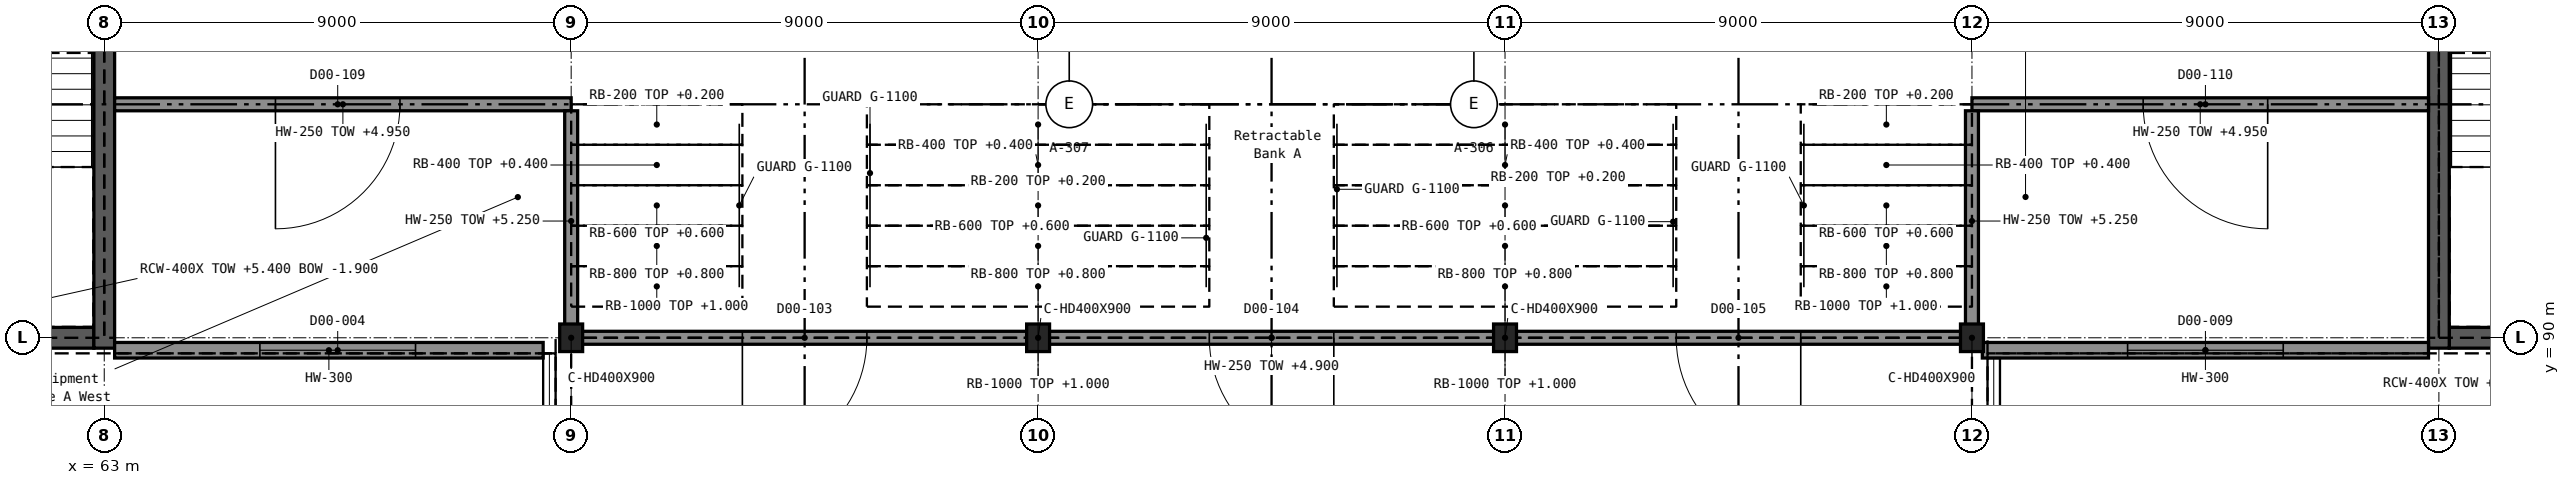
"""IFC4 building model, lengths in metres.
Left out: names, types, materials, properties, quantities, classifications, styles, units other than length and angle.
Written with IfcOpenShell. Run it as: python <this file> out.ifc"""

import sys

from ifc_helpers import new_model, si_unit, direction, frame, frame_2d, origin, origin_2d, place, context, subcontext, project, spatial, rectangle, i_section, extrude, element, fill, save


model = new_model("IFC4")
c1 = context("Model", 3, precision=1e-05, world=origin(), true_north=direction((0.0, 1.0)))
c2 = subcontext(c1, "Body", "Model", "MODEL_VIEW")
j1 = project(units=[si_unit("LENGTHUNIT", "METRE"), si_unit("PLANEANGLEUNIT", "RADIAN")], contexts=[c1])
p1 = place(None, origin())
s1 = spatial("IfcSite", under=j1, at=p1, CompositionType="ELEMENT")
p2 = place(p1, origin())
s2 = spatial("IfcBuilding", under=s1, at=p2, CompositionType="ELEMENT")
p3 = place(p2, origin())
s3 = spatial("IfcBuildingStorey", under=s2, at=p3, CompositionType="ELEMENT", Elevation=0.0)
for number, where, z_axis, x_axis in (
    (1, (72.0, 90.0, -0.3), (0.0, 0.0, 1.0), (1.0, 0.0, 0.0)),
    (2, (81.0, 90.0, -0.3), (0.0, 0.0, 1.0), (1.0, 0.0, 0.0)),
    (3, (90.0, 90.0, -0.3), (0.0, 0.0, 1.0), (1.0, 0.0, 0.0)),
    (4, (99.0, 90.0, -0.3), (0.0, 0.0, 1.0), (1.0, 0.0, 0.0)),
):
    element("IfcColumn", number, at=place(p3, frame(where, z_axis=z_axis, x_axis=x_axis)), inside=s3, PredefinedType="COLUMN", context=c2, shape_type="SweptSolid", body=[
        extrude(i_section(OverallWidth=0.442, OverallDepth=0.531, WebThickness=0.066, FlangeThickness=0.106, FilletRadius=0.015, at=origin_2d()), origin(), (0.0, 0.0, 1.0), 5.7),
    ])
p4 = place(p3, frame((54.2, 90.0, -1.9), z_axis=(0.0, 0.0, 1.0), x_axis=(1.0, 0.0, 0.0)))
e5 = element("IfcWall", 5, at=p4, inside=s3, PredefinedType="SHEAR", context=c2, shape_type="SweptSolid", body=[
    extrude(rectangle(XDim=8.6, YDim=0.4, at=frame_2d((4.3, 0.0))), origin(), (0.0, 0.0, 1.0), 7.3),
])
p5 = place(p4, frame((3.9, 0.0, 3.4)))
e6 = element("IfcOpeningElement", 6, at=p5, cuts=e5, PredefinedType="OPENING", context=c2, shape_type="SweptSolid", body=[
    extrude(rectangle(XDim=1.2, YDim=1.8, at=frame_2d((0.6, 0.9))), frame((0.0, 0.211, 0.0), z_axis=(0.0, -1.0, 0.0), x_axis=(1.0, 0.0, 0.0)), (0.0, 0.0, 1.0), 0.422),
])
p6 = place(p4, frame((0.7, 0.0, 1.9)))
e7 = element("IfcOpeningElement", 7, at=p6, cuts=e5, PredefinedType="OPENING", context=c2, shape_type="SweptSolid", body=[
    extrude(rectangle(XDim=1.2, YDim=2.1, at=frame_2d((0.6, 1.05))), frame((0.0, 0.211, 0.0), z_axis=(0.0, -1.0, 0.0), x_axis=(1.0, 0.0, 0.0)), (0.0, 0.0, 1.0), 0.422),
])
p7 = place(p3, frame((63.0, 89.8, -1.9), z_axis=(0.0, 0.0, 1.0), x_axis=(0.0, 1.0, 0.0)))
e8 = element("IfcWall", 8, at=p7, inside=s3, PredefinedType="SHEAR", context=c2, shape_type="SweptSolid", body=[
    extrude(rectangle(XDim=27.4, YDim=0.4, at=frame_2d((13.7, 0.0))), origin(), (0.0, 0.0, 1.0), 7.3),
])
p8 = place(p3, frame((108.2, 90.0, -1.9), z_axis=(0.0, 0.0, 1.0), x_axis=(1.0, 0.0, 0.0)))
e9 = element("IfcWall", 9, at=p8, inside=s3, PredefinedType="SHEAR", context=c2, shape_type="SweptSolid", body=[
    extrude(rectangle(XDim=8.6, YDim=0.4, at=frame_2d((4.3, 0.0))), origin(), (0.0, 0.0, 1.0), 7.3),
])
p9 = place(p8, frame((3.9, 0.0, 3.4)))
e10 = element("IfcOpeningElement", 10, at=p9, cuts=e9, PredefinedType="OPENING", context=c2, shape_type="SweptSolid", body=[
    extrude(rectangle(XDim=1.2, YDim=1.8, at=frame_2d((0.6, 0.9))), frame((0.0, 0.211, 0.0), z_axis=(0.0, -1.0, 0.0), x_axis=(1.0, 0.0, 0.0)), (0.0, 0.0, 1.0), 0.422),
])
p10 = place(p8, frame((6.7, 0.0, 1.9)))
e11 = element("IfcOpeningElement", 11, at=p10, cuts=e9, PredefinedType="OPENING", context=c2, shape_type="SweptSolid", body=[
    extrude(rectangle(XDim=1.2, YDim=2.1, at=frame_2d((0.6, 1.05))), frame((0.0, 0.211, 0.0), z_axis=(0.0, -1.0, 0.0), x_axis=(1.0, 0.0, 0.0)), (0.0, 0.0, 1.0), 0.422),
])
p11 = place(p3, frame((108.0, 89.8, -1.9), z_axis=(0.0, 0.0, 1.0), x_axis=(0.0, 1.0, 0.0)))
e12 = element("IfcWall", 12, at=p11, inside=s3, PredefinedType="SHEAR", context=c2, shape_type="SweptSolid", body=[
    extrude(rectangle(XDim=27.4, YDim=0.4, at=frame_2d((13.7, 0.0))), origin(), (0.0, 0.0, 1.0), 7.3),
])
p12 = place(p3, frame((63.2, 89.76, 0.0), z_axis=(0.0, 0.0, 1.0), x_axis=(1.0, 0.0, 0.0)))
e13 = element("IfcWall", 13, at=p12, inside=s3, PredefinedType="SOLIDWALL", context=c2, shape_type="SweptSolid", body=[
    extrude(rectangle(XDim=8.26, YDim=0.3, at=frame_2d((4.13, 0.0))), origin(), (0.0, 0.0, 1.0), 5.4),
])
p13 = place(p12, frame((2.8, 0.0, 0.0)))
e14 = element("IfcOpeningElement", 14, at=p13, cuts=e13, PredefinedType="OPENING", context=c2, shape_type="SweptSolid", body=[
    extrude(rectangle(XDim=3.0, YDim=2.4, at=frame_2d((1.5, 1.2))), frame((0.0, 0.161, 0.0), z_axis=(0.0, -1.0, 0.0), x_axis=(1.0, 0.0, 0.0)), (0.0, 0.0, 1.0), 0.322),
])
p14 = place(p3, frame((99.2, 89.76, 0.0), z_axis=(0.0, 0.0, 1.0), x_axis=(1.0, 0.0, 0.0)))
e15 = element("IfcWall", 15, at=p14, inside=s3, PredefinedType="SOLIDWALL", context=c2, shape_type="SweptSolid", body=[
    extrude(rectangle(XDim=8.6, YDim=0.3, at=frame_2d((4.3, 0.0))), origin(), (0.0, 0.0, 1.0), 5.4),
])
p15 = place(p14, frame((2.8, 0.0, 0.0)))
e16 = element("IfcOpeningElement", 16, at=p15, cuts=e15, PredefinedType="OPENING", context=c2, shape_type="SweptSolid", body=[
    extrude(rectangle(XDim=3.0, YDim=2.4, at=frame_2d((1.5, 1.2))), frame((0.0, 0.161, 0.0), z_axis=(0.0, -1.0, 0.0), x_axis=(1.0, 0.0, 0.0)), (0.0, 0.0, 1.0), 0.322),
])
p16 = place(p3, frame((72.0, 90.0, 0.0), z_axis=(0.0, 0.0, 1.0), x_axis=(1.0, 0.0, 0.0)))
e17 = element("IfcWall", 17, at=p16, inside=s3, PredefinedType="SOLIDWALL", context=c2, shape_type="SweptSolid", body=[
    extrude(rectangle(XDim=27.0, YDim=0.25, at=frame_2d((13.5, 0.0))), origin(), (0.0, 0.0, 1.0), 4.9),
])
p17 = place(p16, frame((3.3, 0.0, 0.0)))
e18 = element("IfcOpeningElement", 18, at=p17, cuts=e17, PredefinedType="OPENING", context=c2, shape_type="SweptSolid", body=[
    extrude(rectangle(XDim=2.4, YDim=2.4, at=frame_2d((1.2, 1.2))), frame((0.0, 0.136, 0.0), z_axis=(0.0, -1.0, 0.0), x_axis=(1.0, 0.0, 0.0)), (0.0, 0.0, 1.0), 0.272),
])
p18 = place(p16, frame((12.3, 0.0, 0.0)))
e19 = element("IfcOpeningElement", 19, at=p18, cuts=e17, PredefinedType="OPENING", context=c2, shape_type="SweptSolid", body=[
    extrude(rectangle(XDim=2.4, YDim=2.4, at=frame_2d((1.2, 1.2))), frame((0.0, 0.136, 0.0), z_axis=(0.0, -1.0, 0.0), x_axis=(1.0, 0.0, 0.0)), (0.0, 0.0, 1.0), 0.272),
])
p19 = place(p16, frame((21.3, 0.0, 0.0)))
e20 = element("IfcOpeningElement", 20, at=p19, cuts=e17, PredefinedType="OPENING", context=c2, shape_type="SweptSolid", body=[
    extrude(rectangle(XDim=2.4, YDim=2.4, at=frame_2d((1.2, 1.2))), frame((0.0, 0.136, 0.0), z_axis=(0.0, -1.0, 0.0), x_axis=(1.0, 0.0, 0.0)), (0.0, 0.0, 1.0), 0.272),
])
p20 = place(p3, frame((63.2, 94.5, 0.0), z_axis=(0.0, 0.0, 1.0), x_axis=(1.0, 0.0, 0.0)))
e21 = element("IfcWall", 21, at=p20, inside=s3, PredefinedType="SOLIDWALL", context=c2, shape_type="SweptSolid", body=[
    extrude(rectangle(XDim=8.8, YDim=0.25, at=frame_2d((4.4, 0.0))), origin(), (0.0, 0.0, 1.0), 4.95),
])
p21 = place(p20, frame((3.1, 0.0, 0.0)))
e22 = element("IfcOpeningElement", 22, at=p21, cuts=e21, PredefinedType="OPENING", context=c2, shape_type="SweptSolid", body=[
    extrude(rectangle(XDim=2.4, YDim=3.0, at=frame_2d((1.2, 1.5))), frame((0.0, 0.136, 0.0), z_axis=(0.0, -1.0, 0.0), x_axis=(1.0, 0.0, 0.0)), (0.0, 0.0, 1.0), 0.272),
])
p22 = place(p3, frame((99.0, 94.5, 0.0), z_axis=(0.0, 0.0, 1.0), x_axis=(1.0, 0.0, 0.0)))
e23 = element("IfcWall", 23, at=p22, inside=s3, PredefinedType="SOLIDWALL", context=c2, shape_type="SweptSolid", body=[
    extrude(rectangle(XDim=8.8, YDim=0.25, at=frame_2d((4.4, 0.0))), origin(), (0.0, 0.0, 1.0), 4.95),
])
p23 = place(p22, frame((3.3, 0.0, 0.0)))
e24 = element("IfcOpeningElement", 24, at=p23, cuts=e23, PredefinedType="OPENING", context=c2, shape_type="SweptSolid", body=[
    extrude(rectangle(XDim=2.4, YDim=3.0, at=frame_2d((1.2, 1.5))), frame((0.0, 0.136, 0.0), z_axis=(0.0, -1.0, 0.0), x_axis=(1.0, 0.0, 0.0)), (0.0, 0.0, 1.0), 0.272),
])
for number, where, z_axis, x_axis in (
    (25, (72.0, 90.125, 0.0), (0.0, 0.0, 1.0), (0.0, 1.0, 0.0)),
    (26, (99.0, 90.125, 0.0), (0.0, 0.0, 1.0), (0.0, 1.0, 0.0)),
):
    element("IfcWall", number, at=place(p3, frame(where, z_axis=z_axis, x_axis=x_axis)), inside=s3, PredefinedType="SOLIDWALL", context=c2, shape_type="SweptSolid", body=[
        extrude(rectangle(XDim=4.25, YDim=0.25, at=frame_2d((2.125, 0.0))), origin(), (0.0, 0.0, 1.0), 5.25),
    ])
p24 = place(p13, frame((3.0, 0.0, 0.0), z_axis=(0.0, 0.0, 1.0), x_axis=(-1.0, 0.0, 0.0)))
e27 = element("IfcDoor", 27, at=p24, inside=s3, OperationType="ROLLINGUP", PredefinedType="DOOR", context=c2, shape_type="SweptSolid", body=[
    extrude(rectangle(XDim=3.0, YDim=2.4, at=frame_2d((1.5, 1.2))), frame((0.0, 0.025, 0.0), z_axis=(0.0, -1.0, 0.0), x_axis=(1.0, 0.0, 0.0)), (0.0, 0.0, 1.0), 0.05),
])
fill(e14, e27)
p25 = place(p15, frame((3.0, 0.0, 0.0), z_axis=(0.0, 0.0, 1.0), x_axis=(-1.0, 0.0, 0.0)))
e28 = element("IfcDoor", 28, at=p25, inside=s3, OperationType="ROLLINGUP", PredefinedType="DOOR", context=c2, shape_type="SweptSolid", body=[
    extrude(rectangle(XDim=3.0, YDim=2.4, at=frame_2d((1.5, 1.2))), frame((0.0, 0.025, 0.0), z_axis=(0.0, -1.0, 0.0), x_axis=(1.0, 0.0, 0.0)), (0.0, 0.0, 1.0), 0.05),
])
fill(e16, e28)
p26 = place(p17, frame((2.4, 0.0, 0.0), z_axis=(0.0, 0.0, 1.0), x_axis=(-1.0, 0.0, 0.0)))
e29 = element("IfcDoor", 29, at=p26, inside=s3, OperationType="DOUBLE_DOOR_SINGLE_SWING", PredefinedType="DOOR", context=c2, shape_type="SweptSolid", body=[
    extrude(rectangle(XDim=2.4, YDim=2.4, at=frame_2d((1.2, 1.2))), frame((0.0, 0.025, 0.0), z_axis=(0.0, -1.0, 0.0), x_axis=(1.0, 0.0, 0.0)), (0.0, 0.0, 1.0), 0.05),
])
fill(e18, e29)
p27 = place(p18, frame((2.4, 0.0, 0.0), z_axis=(0.0, 0.0, 1.0), x_axis=(-1.0, 0.0, 0.0)))
e30 = element("IfcDoor", 30, at=p27, inside=s3, OperationType="DOUBLE_DOOR_SINGLE_SWING", PredefinedType="DOOR", context=c2, shape_type="SweptSolid", body=[
    extrude(rectangle(XDim=2.4, YDim=2.4, at=frame_2d((1.2, 1.2))), frame((0.0, 0.025, 0.0), z_axis=(0.0, -1.0, 0.0), x_axis=(1.0, 0.0, 0.0)), (0.0, 0.0, 1.0), 0.05),
])
fill(e19, e30)
p28 = place(p19, frame((2.4, 0.0, 0.0), z_axis=(0.0, 0.0, 1.0), x_axis=(-1.0, 0.0, 0.0)))
e31 = element("IfcDoor", 31, at=p28, inside=s3, OperationType="DOUBLE_DOOR_SINGLE_SWING", PredefinedType="DOOR", context=c2, shape_type="SweptSolid", body=[
    extrude(rectangle(XDim=2.4, YDim=2.4, at=frame_2d((1.2, 1.2))), frame((0.0, 0.025, 0.0), z_axis=(0.0, -1.0, 0.0), x_axis=(1.0, 0.0, 0.0)), (0.0, 0.0, 1.0), 0.05),
])
fill(e20, e31)
p29 = place(p21, frame((2.4, 0.0, 0.0), z_axis=(0.0, 0.0, 1.0), x_axis=(-1.0, 0.0, 0.0)))
e32 = element("IfcDoor", 32, at=p29, inside=s3, OperationType="DOUBLE_DOOR_SINGLE_SWING", PredefinedType="DOOR", context=c2, shape_type="SweptSolid", body=[
    extrude(rectangle(XDim=2.4, YDim=3.0, at=frame_2d((1.2, 1.5))), frame((0.0, 0.025, 0.0), z_axis=(0.0, -1.0, 0.0), x_axis=(1.0, 0.0, 0.0)), (0.0, 0.0, 1.0), 0.05),
])
fill(e22, e32)
p30 = place(p23, frame((2.4, 0.0, 0.0), z_axis=(0.0, 0.0, 1.0), x_axis=(-1.0, 0.0, 0.0)))
e33 = element("IfcDoor", 33, at=p30, inside=s3, OperationType="DOUBLE_DOOR_SINGLE_SWING", PredefinedType="DOOR", context=c2, shape_type="SweptSolid", body=[
    extrude(rectangle(XDim=2.4, YDim=3.0, at=frame_2d((1.2, 1.5))), frame((0.0, 0.025, 0.0), z_axis=(0.0, -1.0, 0.0), x_axis=(1.0, 0.0, 0.0)), (0.0, 0.0, 1.0), 0.05),
])
fill(e24, e33)
save(model, sys.argv[1])
